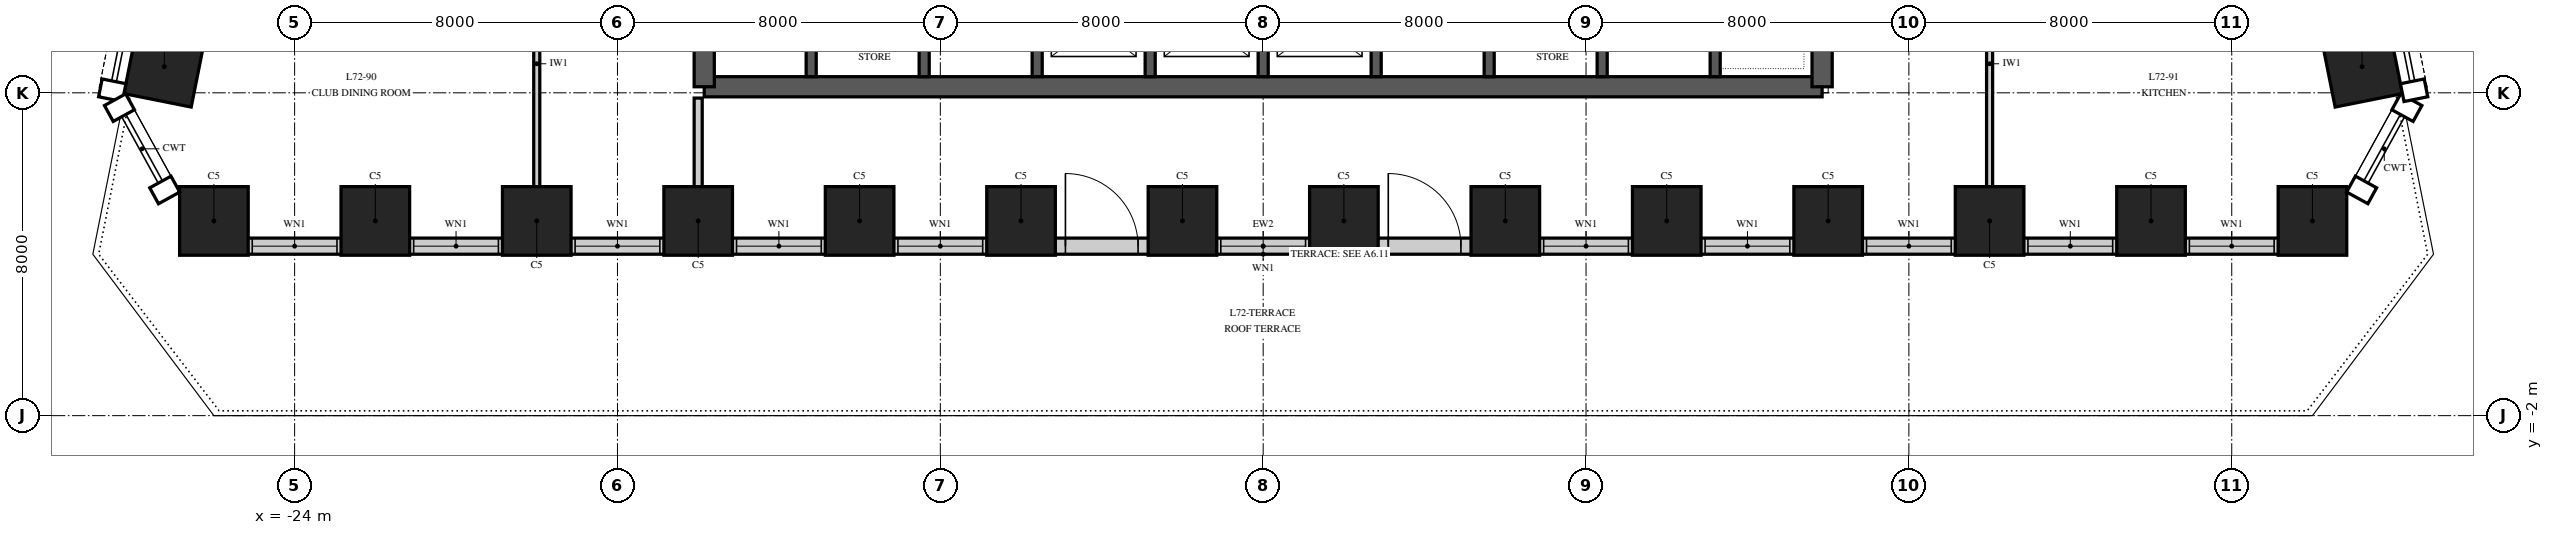
"""IFC4 building model, lengths in metres.
Left out: names, types, materials, properties, quantities, classifications, styles, units other than length and angle.
Written with IfcOpenShell. Run it as: python <this file> out.ifc"""

import sys

from ifc_helpers import new_model, si_unit, direction, frame, frame_2d, origin, origin_2d, place, context, subcontext, project, spatial, polyline, rectangle, outline, extrude, element, fill, save


model = new_model("IFC4")
c1 = context("Model", 3, precision=1e-05, world=origin(), true_north=direction((0.0, 1.0)))
c2 = subcontext(c1, "Body", "Model", "MODEL_VIEW")
j1 = project(units=[si_unit("LENGTHUNIT", "METRE"), si_unit("PLANEANGLEUNIT", "RADIAN")], contexts=[c1])
p1 = place(None, origin())
s1 = spatial("IfcSite", under=j1, at=p1, CompositionType="ELEMENT")
p2 = place(p1, origin())
s2 = spatial("IfcBuilding", under=s1, at=p2, CompositionType="ELEMENT")
p3 = place(p2, frame((0.0, 0.0, 308.0)))
s3 = spatial("IfcBuildingStorey", under=s2, at=p3, CompositionType="ELEMENT", Elevation=308.0)
for number, where, z_axis, x_axis in (
    (1, (-26.0, 2.825, -0.25), (0.0, 0.0, 1.0), (1.0, 0.0, 0.0)),
    (2, (-22.0, 2.825, -0.25), (0.0, 0.0, 1.0), (1.0, 0.0, 0.0)),
    (3, (-18.0, 2.825, -0.25), (0.0, 0.0, 1.0), (1.0, 0.0, 0.0)),
    (4, (-14.0, 2.825, -0.25), (0.0, 0.0, 1.0), (1.0, 0.0, 0.0)),
    (5, (-10.0, 2.825, -0.25), (0.0, 0.0, 1.0), (1.0, 0.0, 0.0)),
    (6, (-6.0, 2.825, -0.25), (0.0, 0.0, 1.0), (1.0, 0.0, 0.0)),
    (7, (-2.0, 2.825, -0.25), (0.0, 0.0, 1.0), (1.0, 0.0, 0.0)),
    (8, (2.0, 2.825, -0.25), (0.0, 0.0, 1.0), (1.0, 0.0, 0.0)),
    (9, (6.0, 2.825, -0.25), (0.0, 0.0, 1.0), (1.0, 0.0, 0.0)),
    (10, (10.0, 2.825, -0.25), (0.0, 0.0, 1.0), (1.0, 0.0, 0.0)),
    (11, (14.0, 2.825, -0.25), (0.0, 0.0, 1.0), (1.0, 0.0, 0.0)),
    (12, (18.0, 2.825, -0.25), (0.0, 0.0, 1.0), (1.0, 0.0, 0.0)),
    (13, (22.0, 2.825, -0.25), (0.0, 0.0, 1.0), (1.0, 0.0, 0.0)),
    (14, (26.0, 2.825, -0.25), (0.0, 0.0, 1.0), (1.0, 0.0, 0.0)),
):
    element("IfcColumn", number, at=place(p3, frame(where, z_axis=z_axis, x_axis=x_axis)), inside=s3, PredefinedType="COLUMN", context=c2, shape_type="SweptSolid", body=[
        extrude(rectangle(XDim=1.7, YDim=1.7, at=origin_2d()), origin(), (0.0, 0.0, 1.0), 4.25),
    ])
for number, where, z_axis, x_axis in (
    (15, (27.229, 6.647, 0.0), (0.0, 0.0, 1.0), (-0.196, 0.981, 0.0)),
    (16, (-27.229, 6.647, 0.0), (0.0, 0.0, 1.0), (-0.196, -0.981, 0.0)),
):
    element("IfcColumn", number, at=place(p3, frame(where, z_axis=z_axis, x_axis=x_axis)), inside=s3, PredefinedType="COLUMN", context=c2, shape_type="SweptSolid", body=[
        extrude(rectangle(XDim=1.7, YDim=1.7, at=origin_2d()), origin(), (0.0, 0.0, 1.0), 4.0),
    ])
p4 = place(p3, frame((-13.85, 6.15, 0.0), z_axis=(0.0, 0.0, 1.0), x_axis=(1.0, 0.0, 0.0)))
e17 = element("IfcWall", 17, at=p4, inside=s3, PredefinedType="SHEAR", context=c2, shape_type="SweptSolid", body=[
    extrude(rectangle(XDim=27.7, YDim=0.5, at=frame_2d((13.85, 0.0))), origin(), (0.0, 0.0, 1.0), 4.0),
])
p5 = place(p3, frame((13.85, 6.15, 0.0), z_axis=(0.0, 0.0, 1.0), x_axis=(0.0, 1.0, 0.0)))
e18 = element("IfcWall", 18, at=p5, inside=s3, PredefinedType="SHEAR", context=c2, shape_type="SweptSolid", body=[
    extrude(outline(polyline([(0.0, -0.25), (17.7, -0.25), (17.7, 0.0), (17.45, 0.0), (17.45, 0.25), (0.25, 0.25), (0.25, 0.0), (0.0, 0.0), (0.0, -0.25)])), origin(), (0.0, 0.0, 1.0), 4.0),
])
p6 = place(p5, frame((4.15, 0.0, 0.0)))
e19 = element("IfcOpeningElement", 19, at=p6, cuts=e18, PredefinedType="OPENING", context=c2, shape_type="SweptSolid", body=[
    extrude(rectangle(XDim=1.8, YDim=2.4, at=frame_2d((0.9, 1.2))), frame((0.0, 0.265, 0.0), z_axis=(0.0, -1.0, 0.0), x_axis=(1.0, 0.0, 0.0)), (0.0, 0.0, 1.0), 0.53),
])
p7 = place(p3, frame((-13.85, 23.85, 0.0), z_axis=(0.0, 0.0, 1.0), x_axis=(0.0, -1.0, 0.0)))
e20 = element("IfcWall", 20, at=p7, inside=s3, PredefinedType="SHEAR", context=c2, shape_type="SweptSolid", body=[
    extrude(outline(polyline([(0.0, -0.25), (17.7, -0.25), (17.7, 0.0), (17.45, 0.0), (17.45, 0.25), (0.25, 0.25), (0.25, 0.0), (0.0, 0.0), (0.0, -0.25)])), origin(), (0.0, 0.0, 1.0), 4.0),
])
p8 = place(p7, frame((11.75, 0.0, 0.0)))
e21 = element("IfcOpeningElement", 21, at=p8, cuts=e20, PredefinedType="OPENING", context=c2, shape_type="SweptSolid", body=[
    extrude(rectangle(XDim=1.8, YDim=2.4, at=frame_2d((0.9, 1.2))), frame((0.0, 0.265, 0.0), z_axis=(0.0, -1.0, 0.0), x_axis=(1.0, 0.0, 0.0)), (0.0, 0.0, 1.0), 0.53),
])
for number, where, z_axis, x_axis in (
    (22, (-11.2, 6.4, 0.0), (0.0, 0.0, 1.0), (0.0, 1.0, 0.0)),
    (23, (-8.4, 6.4, 0.0), (0.0, 0.0, 1.0), (0.0, 1.0, 0.0)),
    (24, (-5.6, 6.4, 0.0), (0.0, 0.0, 1.0), (0.0, 1.0, 0.0)),
    (25, (-2.8, 6.4, 0.0), (0.0, 0.0, 1.0), (0.0, 1.0, 0.0)),
    (26, (0.0, 6.4, 0.0), (0.0, 0.0, 1.0), (0.0, 1.0, 0.0)),
    (27, (2.8, 6.4, 0.0), (0.0, 0.0, 1.0), (0.0, 1.0, 0.0)),
    (28, (5.6, 6.4, 0.0), (0.0, 0.0, 1.0), (0.0, 1.0, 0.0)),
    (29, (8.4, 6.4, 0.0), (0.0, 0.0, 1.0), (0.0, 1.0, 0.0)),
    (30, (11.2, 6.4, 0.0), (0.0, 0.0, 1.0), (0.0, 1.0, 0.0)),
):
    element("IfcWall", number, at=place(p3, frame(where, z_axis=z_axis, x_axis=x_axis)), inside=s3, PredefinedType="SHEAR", context=c2, shape_type="SweptSolid", body=[
        extrude(rectangle(XDim=2.875, YDim=0.25, at=frame_2d((1.438, 0.0))), origin(), (0.0, 0.0, 1.0), 4.0),
    ])
p9 = place(p3, frame((-26.0, 2.2, 0.0), z_axis=(0.0, 0.0, 1.0), x_axis=(1.0, 0.0, 0.0)))
e31 = element("IfcWall", 31, at=p9, inside=s3, PredefinedType="SOLIDWALL", context=c2, shape_type="SweptSolid", body=[
    extrude(rectangle(XDim=52.0, YDim=0.4, at=frame_2d((26.0, 0.0))), origin(), (0.0, 0.0, 1.0), 2.0),
])
p10 = place(p9, frame((0.95, 0.0, 0.8)))
e32 = element("IfcOpeningElement", 32, at=p10, cuts=e31, PredefinedType="OPENING", context=c2, shape_type="SweptSolid", body=[
    extrude(rectangle(XDim=2.1, YDim=1.15, at=frame_2d((1.05, 0.575))), frame((0.0, 0.215, 0.0), z_axis=(0.0, -1.0, 0.0), x_axis=(1.0, 0.0, 0.0)), (0.0, 0.0, 1.0), 0.43),
])
p11 = place(p9, frame((4.95, 0.0, 0.8)))
e33 = element("IfcOpeningElement", 33, at=p11, cuts=e31, PredefinedType="OPENING", context=c2, shape_type="SweptSolid", body=[
    extrude(rectangle(XDim=2.1, YDim=1.15, at=frame_2d((1.05, 0.575))), frame((0.0, 0.215, 0.0), z_axis=(0.0, -1.0, 0.0), x_axis=(1.0, 0.0, 0.0)), (0.0, 0.0, 1.0), 0.43),
])
p12 = place(p9, frame((8.95, 0.0, 0.8)))
e34 = element("IfcOpeningElement", 34, at=p12, cuts=e31, PredefinedType="OPENING", context=c2, shape_type="SweptSolid", body=[
    extrude(rectangle(XDim=2.1, YDim=1.15, at=frame_2d((1.05, 0.575))), frame((0.0, 0.215, 0.0), z_axis=(0.0, -1.0, 0.0), x_axis=(1.0, 0.0, 0.0)), (0.0, 0.0, 1.0), 0.43),
])
p13 = place(p9, frame((12.95, 0.0, 0.8)))
e35 = element("IfcOpeningElement", 35, at=p13, cuts=e31, PredefinedType="OPENING", context=c2, shape_type="SweptSolid", body=[
    extrude(rectangle(XDim=2.1, YDim=1.15, at=frame_2d((1.05, 0.575))), frame((0.0, 0.215, 0.0), z_axis=(0.0, -1.0, 0.0), x_axis=(1.0, 0.0, 0.0)), (0.0, 0.0, 1.0), 0.43),
])
p14 = place(p9, frame((16.95, 0.0, 0.8)))
e36 = element("IfcOpeningElement", 36, at=p14, cuts=e31, PredefinedType="OPENING", context=c2, shape_type="SweptSolid", body=[
    extrude(rectangle(XDim=2.1, YDim=1.15, at=frame_2d((1.05, 0.575))), frame((0.0, 0.215, 0.0), z_axis=(0.0, -1.0, 0.0), x_axis=(1.0, 0.0, 0.0)), (0.0, 0.0, 1.0), 0.43),
])
p15 = place(p9, frame((21.1, 0.0, 0.0)))
e37 = element("IfcOpeningElement", 37, at=p15, cuts=e31, PredefinedType="OPENING", context=c2, shape_type="SweptSolid", body=[
    extrude(rectangle(XDim=1.8, YDim=2.0, at=frame_2d((0.9, 1.0))), frame((0.0, 0.215, 0.0), z_axis=(0.0, -1.0, 0.0), x_axis=(1.0, 0.0, 0.0)), (0.0, 0.0, 1.0), 0.43),
])
p16 = place(p9, frame((24.95, 0.0, 0.8)))
e38 = element("IfcOpeningElement", 38, at=p16, cuts=e31, PredefinedType="OPENING", context=c2, shape_type="SweptSolid", body=[
    extrude(rectangle(XDim=2.1, YDim=1.15, at=frame_2d((1.05, 0.575))), frame((0.0, 0.215, 0.0), z_axis=(0.0, -1.0, 0.0), x_axis=(1.0, 0.0, 0.0)), (0.0, 0.0, 1.0), 0.43),
])
p17 = place(p9, frame((29.1, 0.0, 0.0)))
e39 = element("IfcOpeningElement", 39, at=p17, cuts=e31, PredefinedType="OPENING", context=c2, shape_type="SweptSolid", body=[
    extrude(rectangle(XDim=1.8, YDim=2.0, at=frame_2d((0.9, 1.0))), frame((0.0, 0.215, 0.0), z_axis=(0.0, -1.0, 0.0), x_axis=(1.0, 0.0, 0.0)), (0.0, 0.0, 1.0), 0.43),
])
p18 = place(p9, frame((32.95, 0.0, 0.8)))
e40 = element("IfcOpeningElement", 40, at=p18, cuts=e31, PredefinedType="OPENING", context=c2, shape_type="SweptSolid", body=[
    extrude(rectangle(XDim=2.1, YDim=1.15, at=frame_2d((1.05, 0.575))), frame((0.0, 0.215, 0.0), z_axis=(0.0, -1.0, 0.0), x_axis=(1.0, 0.0, 0.0)), (0.0, 0.0, 1.0), 0.43),
])
p19 = place(p9, frame((36.95, 0.0, 0.8)))
e41 = element("IfcOpeningElement", 41, at=p19, cuts=e31, PredefinedType="OPENING", context=c2, shape_type="SweptSolid", body=[
    extrude(rectangle(XDim=2.1, YDim=1.15, at=frame_2d((1.05, 0.575))), frame((0.0, 0.215, 0.0), z_axis=(0.0, -1.0, 0.0), x_axis=(1.0, 0.0, 0.0)), (0.0, 0.0, 1.0), 0.43),
])
p20 = place(p9, frame((40.95, 0.0, 0.8)))
e42 = element("IfcOpeningElement", 42, at=p20, cuts=e31, PredefinedType="OPENING", context=c2, shape_type="SweptSolid", body=[
    extrude(rectangle(XDim=2.1, YDim=1.15, at=frame_2d((1.05, 0.575))), frame((0.0, 0.215, 0.0), z_axis=(0.0, -1.0, 0.0), x_axis=(1.0, 0.0, 0.0)), (0.0, 0.0, 1.0), 0.43),
])
p21 = place(p9, frame((44.95, 0.0, 0.8)))
e43 = element("IfcOpeningElement", 43, at=p21, cuts=e31, PredefinedType="OPENING", context=c2, shape_type="SweptSolid", body=[
    extrude(rectangle(XDim=2.1, YDim=1.15, at=frame_2d((1.05, 0.575))), frame((0.0, 0.215, 0.0), z_axis=(0.0, -1.0, 0.0), x_axis=(1.0, 0.0, 0.0)), (0.0, 0.0, 1.0), 0.43),
])
p22 = place(p9, frame((48.95, 0.0, 0.8)))
e44 = element("IfcOpeningElement", 44, at=p22, cuts=e31, PredefinedType="OPENING", context=c2, shape_type="SweptSolid", body=[
    extrude(rectangle(XDim=2.1, YDim=1.15, at=frame_2d((1.05, 0.575))), frame((0.0, 0.215, 0.0), z_axis=(0.0, -1.0, 0.0), x_axis=(1.0, 0.0, 0.0)), (0.0, 0.0, 1.0), 0.43),
])
p23 = place(p3, frame((-18.0, 3.675, 0.0), z_axis=(0.0, 0.0, 1.0), x_axis=(0.0, 1.0, 0.0)))
e45 = element("IfcWall", 45, at=p23, inside=s3, PredefinedType="PARTITIONING", context=c2, shape_type="SweptSolid", body=[
    extrude(rectangle(XDim=6.09, YDim=0.15, at=frame_2d((3.045, 0.0))), origin(), (0.0, 0.0, 1.0), 2.842),
])
p24 = place(p3, frame((-14.0, 3.675, 0.0), z_axis=(0.0, 0.0, 1.0), x_axis=(0.0, 1.0, 0.0)))
e46 = element("IfcWall", 46, at=p24, inside=s3, PredefinedType="PARTITIONING", context=c2, shape_type="SweptSolid", body=[
    extrude(rectangle(XDim=2.195, YDim=0.2, at=frame_2d((1.098, 0.0))), origin(), (0.0, 0.0, 1.0), 3.23),
])
p25 = place(p3, frame((18.0, 3.675, 0.0), z_axis=(0.0, 0.0, 1.0), x_axis=(0.0, 1.0, 0.0)))
e47 = element("IfcWall", 47, at=p25, inside=s3, PredefinedType="PARTITIONING", context=c2, shape_type="SweptSolid", body=[
    extrude(rectangle(XDim=6.09, YDim=0.15, at=frame_2d((3.045, 0.0))), origin(), (0.0, 0.0, 1.0), 2.842),
])
p26 = place(p10, origin())
e48 = element("IfcWindow", 48, at=p26, inside=s3, PartitioningType="SINGLE_PANEL", PredefinedType="WINDOW", context=c2, shape_type="SweptSolid", body=[
    extrude(rectangle(XDim=2.1, YDim=1.15, at=frame_2d((1.05, 0.575))), frame((0.0, 0.03, 0.0), z_axis=(0.0, -1.0, 0.0), x_axis=(1.0, 0.0, 0.0)), (0.0, 0.0, 1.0), 0.06),
])
fill(e32, e48)
p27 = place(p11, origin())
e49 = element("IfcWindow", 49, at=p27, inside=s3, PartitioningType="SINGLE_PANEL", PredefinedType="WINDOW", context=c2, shape_type="SweptSolid", body=[
    extrude(rectangle(XDim=2.1, YDim=1.15, at=frame_2d((1.05, 0.575))), frame((0.0, 0.03, 0.0), z_axis=(0.0, -1.0, 0.0), x_axis=(1.0, 0.0, 0.0)), (0.0, 0.0, 1.0), 0.06),
])
fill(e33, e49)
p28 = place(p12, origin())
e50 = element("IfcWindow", 50, at=p28, inside=s3, PartitioningType="SINGLE_PANEL", PredefinedType="WINDOW", context=c2, shape_type="SweptSolid", body=[
    extrude(rectangle(XDim=2.1, YDim=1.15, at=frame_2d((1.05, 0.575))), frame((0.0, 0.03, 0.0), z_axis=(0.0, -1.0, 0.0), x_axis=(1.0, 0.0, 0.0)), (0.0, 0.0, 1.0), 0.06),
])
fill(e34, e50)
p29 = place(p13, origin())
e51 = element("IfcWindow", 51, at=p29, inside=s3, PartitioningType="SINGLE_PANEL", PredefinedType="WINDOW", context=c2, shape_type="SweptSolid", body=[
    extrude(rectangle(XDim=2.1, YDim=1.15, at=frame_2d((1.05, 0.575))), frame((0.0, 0.03, 0.0), z_axis=(0.0, -1.0, 0.0), x_axis=(1.0, 0.0, 0.0)), (0.0, 0.0, 1.0), 0.06),
])
fill(e35, e51)
p30 = place(p14, origin())
e52 = element("IfcWindow", 52, at=p30, inside=s3, PartitioningType="SINGLE_PANEL", PredefinedType="WINDOW", context=c2, shape_type="SweptSolid", body=[
    extrude(rectangle(XDim=2.1, YDim=1.15, at=frame_2d((1.05, 0.575))), frame((0.0, 0.03, 0.0), z_axis=(0.0, -1.0, 0.0), x_axis=(1.0, 0.0, 0.0)), (0.0, 0.0, 1.0), 0.06),
])
fill(e36, e52)
p31 = place(p15, origin())
e53 = element("IfcDoor", 53, at=p31, inside=s3, OperationType="DOUBLE_DOOR_SINGLE_SWING", PredefinedType="DOOR", context=c2, shape_type="SweptSolid", body=[
    extrude(rectangle(XDim=1.8, YDim=2.0, at=frame_2d((0.9, 1.0))), frame((0.0, 0.2, 0.0), z_axis=(0.0, -1.0, 0.0), x_axis=(1.0, 0.0, 0.0)), (0.0, 0.0, 1.0), 0.399),
])
fill(e37, e53)
p32 = place(p16, origin())
e54 = element("IfcWindow", 54, at=p32, inside=s3, PartitioningType="SINGLE_PANEL", PredefinedType="WINDOW", context=c2, shape_type="SweptSolid", body=[
    extrude(rectangle(XDim=2.1, YDim=1.15, at=frame_2d((1.05, 0.575))), frame((0.0, 0.03, 0.0), z_axis=(0.0, -1.0, 0.0), x_axis=(1.0, 0.0, 0.0)), (0.0, 0.0, 1.0), 0.06),
])
fill(e38, e54)
p33 = place(p17, origin())
e55 = element("IfcDoor", 55, at=p33, inside=s3, OperationType="DOUBLE_DOOR_SINGLE_SWING", PredefinedType="DOOR", context=c2, shape_type="SweptSolid", body=[
    extrude(rectangle(XDim=1.8, YDim=2.0, at=frame_2d((0.9, 1.0))), frame((0.0, 0.2, 0.0), z_axis=(0.0, -1.0, 0.0), x_axis=(1.0, 0.0, 0.0)), (0.0, 0.0, 1.0), 0.399),
])
fill(e39, e55)
p34 = place(p18, origin())
e56 = element("IfcWindow", 56, at=p34, inside=s3, PartitioningType="SINGLE_PANEL", PredefinedType="WINDOW", context=c2, shape_type="SweptSolid", body=[
    extrude(rectangle(XDim=2.1, YDim=1.15, at=frame_2d((1.05, 0.575))), frame((0.0, 0.03, 0.0), z_axis=(0.0, -1.0, 0.0), x_axis=(1.0, 0.0, 0.0)), (0.0, 0.0, 1.0), 0.06),
])
fill(e40, e56)
p35 = place(p19, origin())
e57 = element("IfcWindow", 57, at=p35, inside=s3, PartitioningType="SINGLE_PANEL", PredefinedType="WINDOW", context=c2, shape_type="SweptSolid", body=[
    extrude(rectangle(XDim=2.1, YDim=1.15, at=frame_2d((1.05, 0.575))), frame((0.0, 0.03, 0.0), z_axis=(0.0, -1.0, 0.0), x_axis=(1.0, 0.0, 0.0)), (0.0, 0.0, 1.0), 0.06),
])
fill(e41, e57)
p36 = place(p20, origin())
e58 = element("IfcWindow", 58, at=p36, inside=s3, PartitioningType="SINGLE_PANEL", PredefinedType="WINDOW", context=c2, shape_type="SweptSolid", body=[
    extrude(rectangle(XDim=2.1, YDim=1.15, at=frame_2d((1.05, 0.575))), frame((0.0, 0.03, 0.0), z_axis=(0.0, -1.0, 0.0), x_axis=(1.0, 0.0, 0.0)), (0.0, 0.0, 1.0), 0.06),
])
fill(e42, e58)
p37 = place(p21, origin())
e59 = element("IfcWindow", 59, at=p37, inside=s3, PartitioningType="SINGLE_PANEL", PredefinedType="WINDOW", context=c2, shape_type="SweptSolid", body=[
    extrude(rectangle(XDim=2.1, YDim=1.15, at=frame_2d((1.05, 0.575))), frame((0.0, 0.03, 0.0), z_axis=(0.0, -1.0, 0.0), x_axis=(1.0, 0.0, 0.0)), (0.0, 0.0, 1.0), 0.06),
])
fill(e43, e59)
p38 = place(p22, origin())
e60 = element("IfcWindow", 60, at=p38, inside=s3, PartitioningType="SINGLE_PANEL", PredefinedType="WINDOW", context=c2, shape_type="SweptSolid", body=[
    extrude(rectangle(XDim=2.1, YDim=1.15, at=frame_2d((1.05, 0.575))), frame((0.0, 0.03, 0.0), z_axis=(0.0, -1.0, 0.0), x_axis=(1.0, 0.0, 0.0)), (0.0, 0.0, 1.0), 0.06),
])
fill(e44, e60)
save(model, sys.argv[1])
